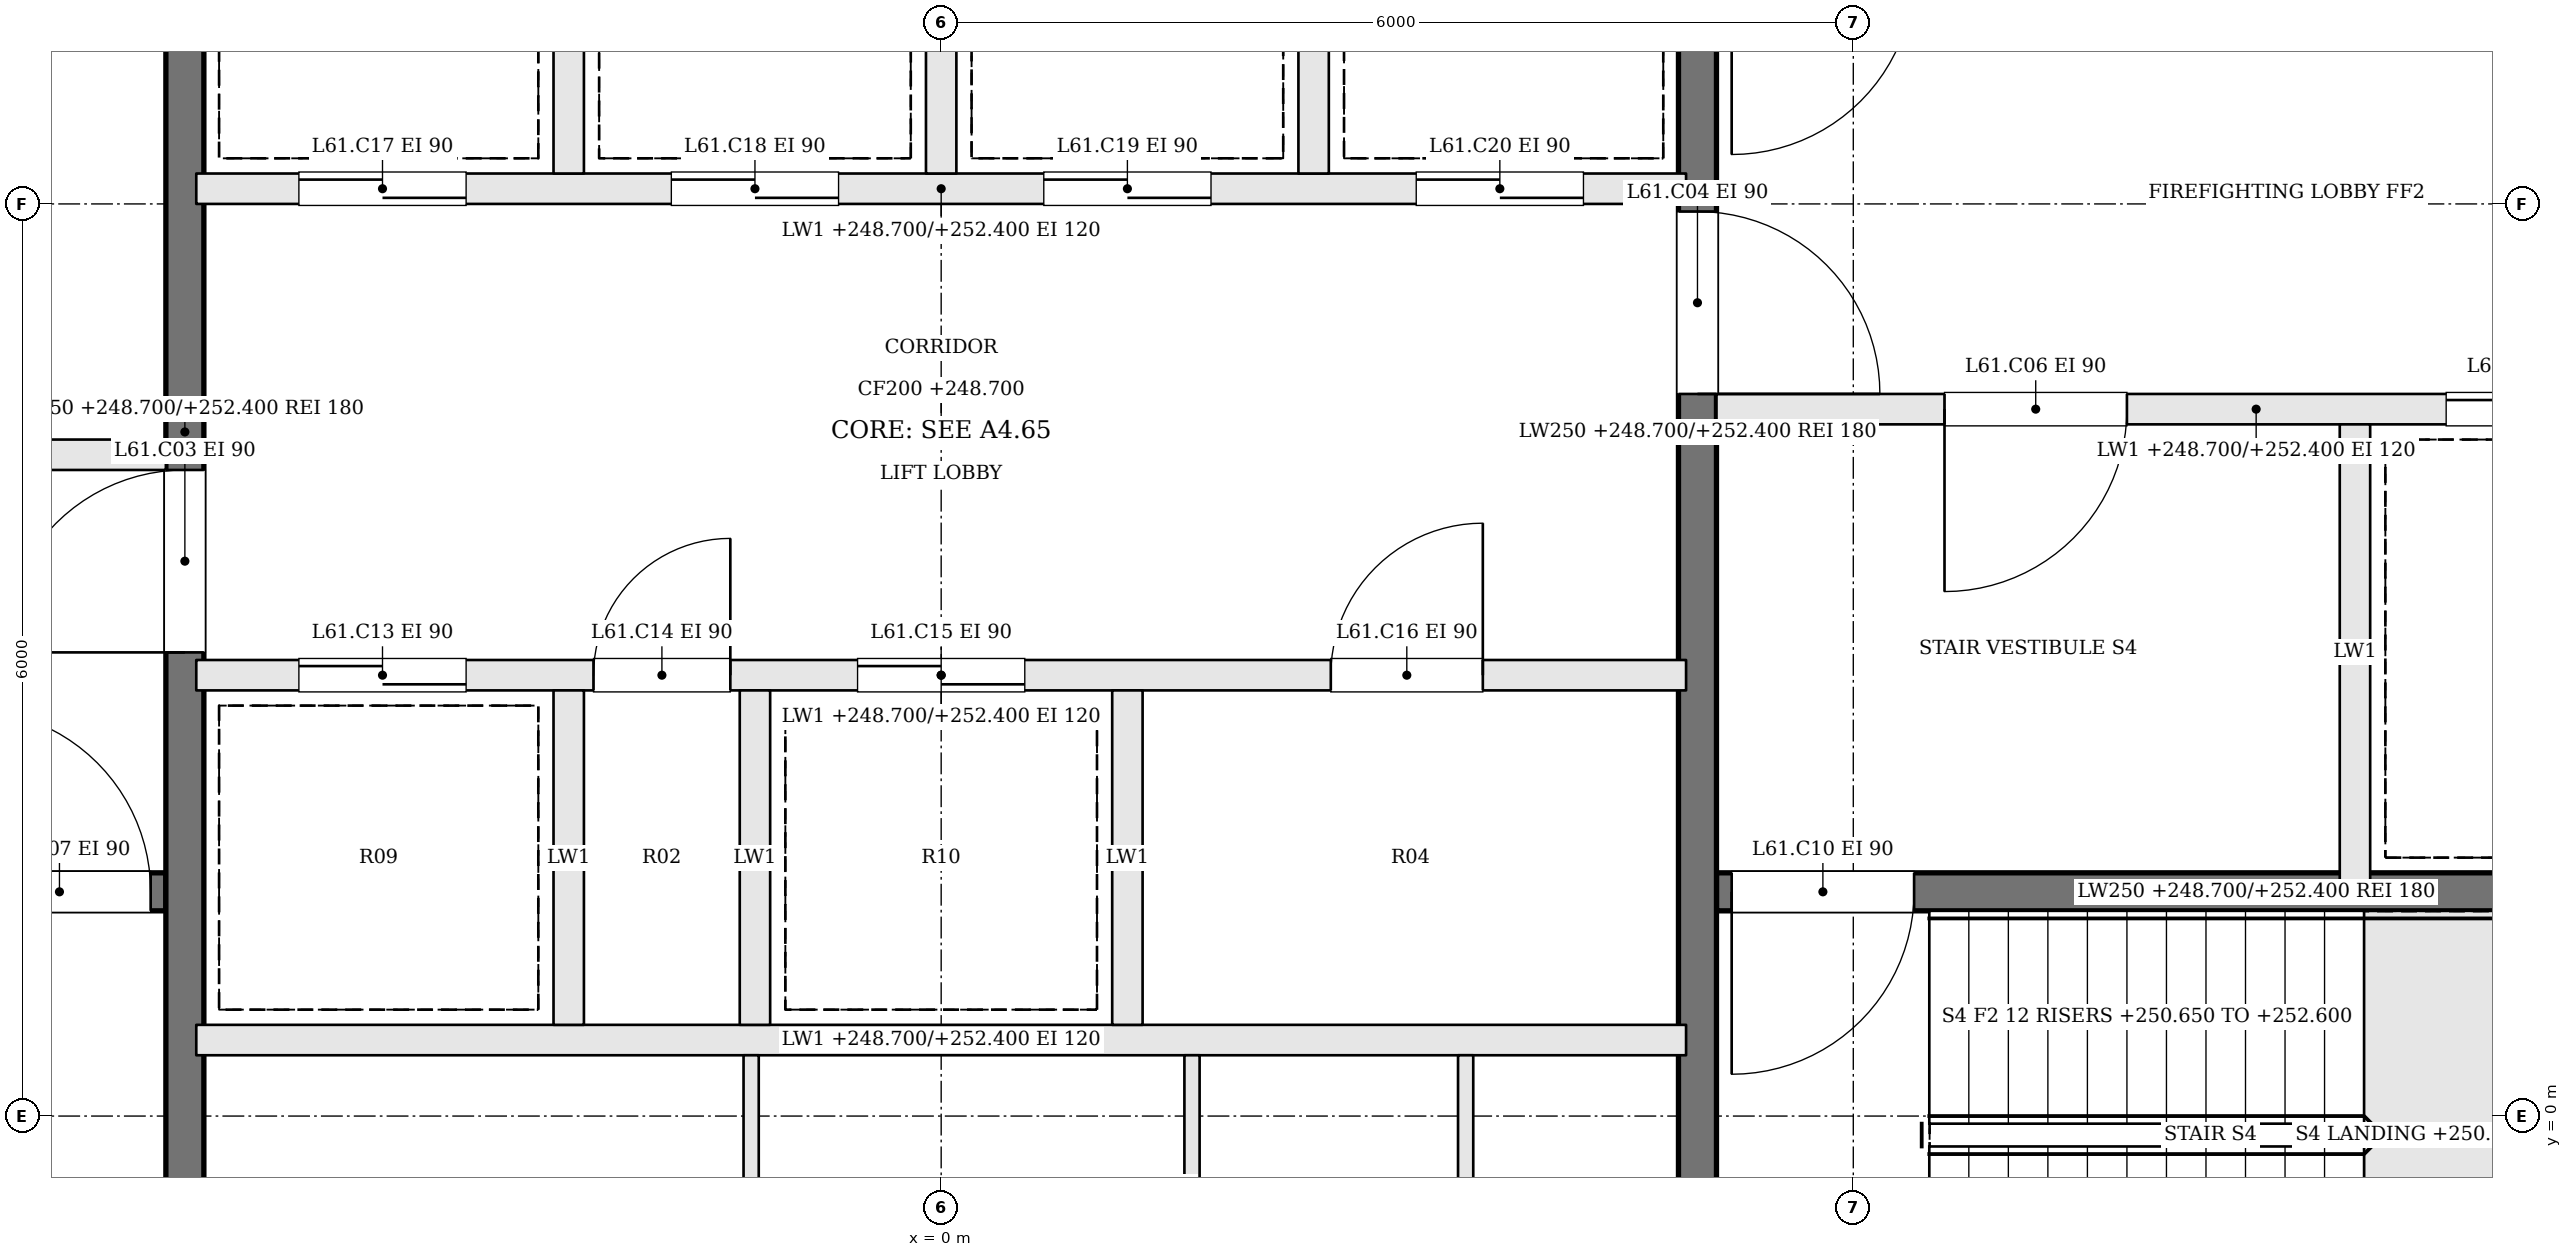
"""IFC4 building model, lengths in metres.
Left out: names, types, materials, properties, quantities, classifications, styles, units other than length and angle.
Written with IfcOpenShell. Run it as: python <this file> out.ifc"""

import sys

from ifc_helpers import new_model, si_unit, direction, frame, frame_2d, origin, place, context, subcontext, project, spatial, rectangle, extrude, element, fill, save


model = new_model("IFC4")
c1 = context("Model", 3, precision=1e-05, world=origin(), true_north=direction((0.0, 1.0)))
c2 = subcontext(c1, "Body", "Model", "MODEL_VIEW")
j1 = project(units=[si_unit("LENGTHUNIT", "METRE"), si_unit("PLANEANGLEUNIT", "RADIAN")], contexts=[c1])
p1 = place(None, origin())
s1 = spatial("IfcSite", under=j1, at=p1, CompositionType="ELEMENT")
p2 = place(p1, origin())
s2 = spatial("IfcBuilding", under=s1, at=p2, CompositionType="ELEMENT")
p3 = place(p2, frame((0.0, 0.0, 248.7)))
s3 = spatial("IfcBuildingStorey", under=s2, at=p3, CompositionType="ELEMENT", Elevation=248.7)
p4 = place(p3, frame((-12.2, 1.475, 0.0), z_axis=(0.0, 0.0, 1.0), x_axis=(1.0, 0.0, 0.0)))
e1 = element("IfcWall", 1, at=p4, inside=s3, PredefinedType="SOLIDWALL", context=c2, shape_type="SweptSolid", body=[
    extrude(rectangle(XDim=7.1, YDim=0.25, at=frame_2d((3.55, 0.0))), origin(), (0.0, 0.0, 1.0), 3.7),
])
p5 = place(p4, frame((5.8, 0.0, 0.0)))
e2 = element("IfcOpeningElement", 2, at=p5, cuts=e1, PredefinedType="OPENING", context=c2, shape_type="SweptSolid", body=[
    extrude(rectangle(XDim=1.2, YDim=2.1, at=frame_2d((0.6, 1.05))), frame((0.0, 0.135, 0.0), z_axis=(0.0, -1.0, 0.0), x_axis=(1.0, 0.0, 0.0)), (0.0, 0.0, 1.0), 0.27),
])
p6 = place(p3, frame((-12.2, 4.35, 0.0), z_axis=(0.0, 0.0, 1.0), x_axis=(1.0, 0.0, 0.0)))
e3 = element("IfcWall", 3, at=p6, inside=s3, PredefinedType="SOLIDWALL", context=c2, shape_type="SweptSolid", body=[
    extrude(rectangle(XDim=7.1, YDim=0.2, at=frame_2d((3.55, 0.0))), origin(), (0.0, 0.0, 1.0), 3.7),
])
p7 = place(p6, frame((4.4, 0.0, 0.0)))
e4 = element("IfcOpeningElement", 4, at=p7, cuts=e3, PredefinedType="OPENING", context=c2, shape_type="SweptSolid", body=[
    extrude(rectangle(XDim=1.2, YDim=2.1, at=frame_2d((0.6, 1.05))), frame((0.0, 0.11, 0.0), z_axis=(0.0, -1.0, 0.0), x_axis=(1.0, 0.0, 0.0)), (0.0, 0.0, 1.0), 0.22),
])
p8 = place(p6, frame((1.1, 0.0, 0.0)))
e5 = element("IfcOpeningElement", 5, at=p8, cuts=e3, PredefinedType="OPENING", context=c2, shape_type="SweptSolid", body=[
    extrude(rectangle(XDim=1.2, YDim=2.1, at=frame_2d((0.6, 1.05))), frame((0.0, 0.11, 0.0), z_axis=(0.0, -1.0, 0.0), x_axis=(1.0, 0.0, 0.0)), (0.0, 0.0, 1.0), 0.22),
])
p9 = place(p3, frame((12.2, 4.65, 0.0), z_axis=(0.0, 0.0, 1.0), x_axis=(-1.0, 0.0, 0.0)))
e6 = element("IfcWall", 6, at=p9, inside=s3, PredefinedType="SOLIDWALL", context=c2, shape_type="SweptSolid", body=[
    extrude(rectangle(XDim=7.1, YDim=0.2, at=frame_2d((3.55, 0.0))), origin(), (0.0, 0.0, 1.0), 3.7),
])
p10 = place(p9, frame((4.4, 0.0, 0.0)))
e7 = element("IfcOpeningElement", 7, at=p10, cuts=e6, PredefinedType="OPENING", context=c2, shape_type="SweptSolid", body=[
    extrude(rectangle(XDim=1.2, YDim=2.1, at=frame_2d((0.6, 1.05))), frame((0.0, 0.11, 0.0), z_axis=(0.0, -1.0, 0.0), x_axis=(1.0, 0.0, 0.0)), (0.0, 0.0, 1.0), 0.22),
])
p11 = place(p9, frame((1.1, 0.0, 0.0)))
e8 = element("IfcOpeningElement", 8, at=p11, cuts=e6, PredefinedType="OPENING", context=c2, shape_type="SweptSolid", body=[
    extrude(rectangle(XDim=1.2, YDim=2.1, at=frame_2d((0.6, 1.05))), frame((0.0, 0.11, 0.0), z_axis=(0.0, -1.0, 0.0), x_axis=(1.0, 0.0, 0.0)), (0.0, 0.0, 1.0), 0.22),
])
p12 = place(p3, frame((12.2, 1.475, 0.0), z_axis=(0.0, 0.0, 1.0), x_axis=(-1.0, 0.0, 0.0)))
e9 = element("IfcWall", 9, at=p12, inside=s3, PredefinedType="SOLIDWALL", context=c2, shape_type="SweptSolid", body=[
    extrude(rectangle(XDim=7.1, YDim=0.25, at=frame_2d((3.55, 0.0))), origin(), (0.0, 0.0, 1.0), 3.7),
])
p13 = place(p12, frame((5.8, 0.0, 0.0)))
e10 = element("IfcOpeningElement", 10, at=p13, cuts=e9, PredefinedType="OPENING", context=c2, shape_type="SweptSolid", body=[
    extrude(rectangle(XDim=1.2, YDim=2.1, at=frame_2d((0.6, 1.05))), frame((0.0, 0.135, 0.0), z_axis=(0.0, -1.0, 0.0), x_axis=(1.0, 0.0, 0.0)), (0.0, 0.0, 1.0), 0.27),
])
p14 = place(p3, frame((9.3, 4.55, 0.0), z_axis=(0.0, 0.0, 1.0), x_axis=(0.0, -1.0, 0.0)))
e11 = element("IfcWall", 11, at=p14, inside=s3, PredefinedType="SOLIDWALL", context=c2, shape_type="SweptSolid", body=[
    extrude(rectangle(XDim=3.0, YDim=0.2, at=frame_2d((1.5, 0.0))), origin(), (0.0, 0.0, 1.0), 3.7),
])
p15 = place(p3, frame((-4.975, -2.2, 0.0), z_axis=(0.0, 0.0, 1.0), x_axis=(0.0, 1.0, 0.0)))
e12 = element("IfcWall", 12, at=p15, inside=s3, PredefinedType="SOLIDWALL", context=c2, shape_type="SweptSolid", body=[
    extrude(rectangle(XDim=13.4, YDim=0.25, at=frame_2d((6.7, 0.0))), origin(), (0.0, 0.0, 1.0), 3.7),
])
p16 = place(p15, frame((5.25, 0.0, 0.0)))
e13 = element("IfcOpeningElement", 13, at=p16, cuts=e12, PredefinedType="OPENING", context=c2, shape_type="SweptSolid", body=[
    extrude(rectangle(XDim=1.2, YDim=2.1, at=frame_2d((0.6, 1.05))), frame((0.0, 0.135, 0.0), z_axis=(0.0, -1.0, 0.0), x_axis=(1.0, 0.0, 0.0)), (0.0, 0.0, 1.0), 0.27),
])
p17 = place(p3, frame((4.975, 11.2, 0.0), z_axis=(0.0, 0.0, 1.0), x_axis=(0.0, -1.0, 0.0)))
e14 = element("IfcWall", 14, at=p17, inside=s3, PredefinedType="SOLIDWALL", context=c2, shape_type="SweptSolid", body=[
    extrude(rectangle(XDim=13.4, YDim=0.25, at=frame_2d((6.7, 0.0))), origin(), (0.0, 0.0, 1.0), 3.7),
])
p18 = place(p17, frame((5.25, 0.0, 0.0)))
e15 = element("IfcOpeningElement", 15, at=p18, cuts=e14, PredefinedType="OPENING", context=c2, shape_type="SweptSolid", body=[
    extrude(rectangle(XDim=1.2, YDim=2.1, at=frame_2d((0.6, 1.05))), frame((0.0, 0.135, 0.0), z_axis=(0.0, -1.0, 0.0), x_axis=(1.0, 0.0, 0.0)), (0.0, 0.0, 1.0), 0.27),
])
p19 = place(p3, frame((-4.9, 0.5, 0.0), z_axis=(0.0, 0.0, 1.0), x_axis=(1.0, 0.0, 0.0)))
e16 = element("IfcWall", 16, at=p19, inside=s3, PredefinedType="SOLIDWALL", context=c2, shape_type="SweptSolid", body=[
    extrude(rectangle(XDim=9.8, YDim=0.2, at=frame_2d((4.9, 0.0))), origin(), (0.0, 0.0, 1.0), 3.7),
])
p20 = place(p3, frame((-4.9, 2.9, 0.0), z_axis=(0.0, 0.0, 1.0), x_axis=(1.0, 0.0, 0.0)))
e17 = element("IfcWall", 17, at=p20, inside=s3, PredefinedType="SOLIDWALL", context=c2, shape_type="SweptSolid", body=[
    extrude(rectangle(XDim=9.8, YDim=0.2, at=frame_2d((4.9, 0.0))), origin(), (0.0, 0.0, 1.0), 3.7),
])
p21 = place(p20, frame((0.675, 0.0, 0.0)))
e18 = element("IfcOpeningElement", 18, at=p21, cuts=e17, PredefinedType="OPENING", context=c2, shape_type="SweptSolid", body=[
    extrude(rectangle(XDim=1.1, YDim=2.1, at=frame_2d((0.55, 1.05))), frame((0.0, 0.11, 0.0), z_axis=(0.0, -1.0, 0.0), x_axis=(1.0, 0.0, 0.0)), (0.0, 0.0, 1.0), 0.22),
])
p22 = place(p20, frame((2.613, 0.0, 0.0)))
e19 = element("IfcOpeningElement", 19, at=p22, cuts=e17, PredefinedType="OPENING", context=c2, shape_type="SweptSolid", body=[
    extrude(rectangle(XDim=0.9, YDim=2.1, at=frame_2d((0.45, 1.05))), frame((0.0, 0.11, 0.0), z_axis=(0.0, -1.0, 0.0), x_axis=(1.0, 0.0, 0.0)), (0.0, 0.0, 1.0), 0.22),
])
p23 = place(p20, frame((4.35, 0.0, 0.0)))
e20 = element("IfcOpeningElement", 20, at=p23, cuts=e17, PredefinedType="OPENING", context=c2, shape_type="SweptSolid", body=[
    extrude(rectangle(XDim=1.1, YDim=2.1, at=frame_2d((0.55, 1.05))), frame((0.0, 0.11, 0.0), z_axis=(0.0, -1.0, 0.0), x_axis=(1.0, 0.0, 0.0)), (0.0, 0.0, 1.0), 0.22),
])
p24 = place(p20, frame((7.463, 0.0, 0.0)))
e21 = element("IfcOpeningElement", 21, at=p24, cuts=e17, PredefinedType="OPENING", context=c2, shape_type="SweptSolid", body=[
    extrude(rectangle(XDim=1.0, YDim=2.1, at=frame_2d((0.5, 1.05))), frame((0.0, 0.11, 0.0), z_axis=(0.0, -1.0, 0.0), x_axis=(1.0, 0.0, 0.0)), (0.0, 0.0, 1.0), 0.22),
])
p25 = place(p3, frame((-4.9, 6.1, 0.0), z_axis=(0.0, 0.0, 1.0), x_axis=(1.0, 0.0, 0.0)))
e22 = element("IfcWall", 22, at=p25, inside=s3, PredefinedType="SOLIDWALL", context=c2, shape_type="SweptSolid", body=[
    extrude(rectangle(XDim=9.8, YDim=0.2, at=frame_2d((4.9, 0.0))), origin(), (0.0, 0.0, 1.0), 3.7),
])
p26 = place(p25, frame((0.675, 0.0, 0.0)))
e23 = element("IfcOpeningElement", 23, at=p26, cuts=e22, PredefinedType="OPENING", context=c2, shape_type="SweptSolid", body=[
    extrude(rectangle(XDim=1.1, YDim=2.1, at=frame_2d((0.55, 1.05))), frame((0.0, 0.11, 0.0), z_axis=(0.0, -1.0, 0.0), x_axis=(1.0, 0.0, 0.0)), (0.0, 0.0, 1.0), 0.22),
])
p27 = place(p25, frame((3.125, 0.0, 0.0)))
e24 = element("IfcOpeningElement", 24, at=p27, cuts=e22, PredefinedType="OPENING", context=c2, shape_type="SweptSolid", body=[
    extrude(rectangle(XDim=1.1, YDim=2.1, at=frame_2d((0.55, 1.05))), frame((0.0, 0.11, 0.0), z_axis=(0.0, -1.0, 0.0), x_axis=(1.0, 0.0, 0.0)), (0.0, 0.0, 1.0), 0.22),
])
p28 = place(p25, frame((5.575, 0.0, 0.0)))
e25 = element("IfcOpeningElement", 25, at=p28, cuts=e22, PredefinedType="OPENING", context=c2, shape_type="SweptSolid", body=[
    extrude(rectangle(XDim=1.1, YDim=2.1, at=frame_2d((0.55, 1.05))), frame((0.0, 0.11, 0.0), z_axis=(0.0, -1.0, 0.0), x_axis=(1.0, 0.0, 0.0)), (0.0, 0.0, 1.0), 0.22),
])
p29 = place(p25, frame((8.025, 0.0, 0.0)))
e26 = element("IfcOpeningElement", 26, at=p29, cuts=e22, PredefinedType="OPENING", context=c2, shape_type="SweptSolid", body=[
    extrude(rectangle(XDim=1.1, YDim=2.1, at=frame_2d((0.55, 1.05))), frame((0.0, 0.11, 0.0), z_axis=(0.0, -1.0, 0.0), x_axis=(1.0, 0.0, 0.0)), (0.0, 0.0, 1.0), 0.22),
])
for number, where, z_axis, x_axis in (
    (27, (-2.45, 0.6, 0.0), (0.0, 0.0, 1.0), (0.0, 1.0, 0.0)),
    (28, (-1.225, 0.6, 0.0), (0.0, 0.0, 1.0), (0.0, 1.0, 0.0)),
    (29, (1.225, 0.6, 0.0), (0.0, 0.0, 1.0), (0.0, 1.0, 0.0)),
    (30, (-2.45, 6.2, 0.0), (0.0, 0.0, 1.0), (0.0, 1.0, 0.0)),
    (31, (0.0, 6.2, 0.0), (0.0, 0.0, 1.0), (0.0, 1.0, 0.0)),
    (32, (2.45, 6.2, 0.0), (0.0, 0.0, 1.0), (0.0, 1.0, 0.0)),
):
    element("IfcWall", number, at=place(p3, frame(where, z_axis=z_axis, x_axis=x_axis)), inside=s3, PredefinedType="SOLIDWALL", context=c2, shape_type="SweptSolid", body=[
        extrude(rectangle(XDim=2.2, YDim=0.2, at=frame_2d((1.1, 0.0))), origin(), (0.0, 0.0, 1.0), 3.7),
    ])
for number, where, z_axis, x_axis in (
    (33, (-1.25, -2.2, 0.0), (0.0, 0.0, 1.0), (0.0, 1.0, 0.0)),
    (34, (1.65, -2.2, 0.0), (0.0, 0.0, 1.0), (0.0, 1.0, 0.0)),
    (35, (3.45, -2.2, 0.0), (0.0, 0.0, 1.0), (0.0, 1.0, 0.0)),
):
    element("IfcWall", number, at=place(p3, frame(where, z_axis=z_axis, x_axis=x_axis)), inside=s3, PredefinedType="PARTITIONING", context=c2, shape_type="SweptSolid", body=[
        extrude(rectangle(XDim=2.6, YDim=0.1, at=frame_2d((1.3, 0.0))), origin(), (0.0, 0.0, 1.0), 3.7),
    ])
p30 = place(p16, origin())
e36 = element("IfcDoor", 36, at=p30, inside=s3, OperationType="SINGLE_SWING_LEFT", PredefinedType="DOOR", context=c2, shape_type="SweptSolid", body=[
    extrude(rectangle(XDim=1.2, YDim=2.1, at=frame_2d((0.6, 1.05))), frame((0.0, 0.025, 0.0), z_axis=(0.0, -1.0, 0.0), x_axis=(1.0, 0.0, 0.0)), (0.0, 0.0, 1.0), 0.05),
])
fill(e13, e36)
p31 = place(p18, origin())
e37 = element("IfcDoor", 37, at=p31, inside=s3, OperationType="SINGLE_SWING_RIGHT", PredefinedType="DOOR", context=c2, shape_type="SweptSolid", body=[
    extrude(rectangle(XDim=1.2, YDim=2.1, at=frame_2d((0.6, 1.05))), frame((0.0, 0.025, 0.0), z_axis=(0.0, -1.0, 0.0), x_axis=(1.0, 0.0, 0.0)), (0.0, 0.0, 1.0), 0.05),
])
fill(e15, e37)
p32 = place(p10, origin())
e38 = element("IfcDoor", 38, at=p32, inside=s3, OperationType="SINGLE_SWING_RIGHT", PredefinedType="DOOR", context=c2, shape_type="SweptSolid", body=[
    extrude(rectangle(XDim=1.2, YDim=2.1, at=frame_2d((0.6, 1.05))), frame((0.0, 0.025, 0.0), z_axis=(0.0, -1.0, 0.0), x_axis=(1.0, 0.0, 0.0)), (0.0, 0.0, 1.0), 0.05),
])
fill(e7, e38)
p33 = place(p5, origin())
e39 = element("IfcDoor", 39, at=p33, inside=s3, OperationType="SINGLE_SWING_LEFT", PredefinedType="DOOR", context=c2, shape_type="SweptSolid", body=[
    extrude(rectangle(XDim=1.2, YDim=2.1, at=frame_2d((0.6, 1.05))), frame((0.0, 0.025, 0.0), z_axis=(0.0, -1.0, 0.0), x_axis=(1.0, 0.0, 0.0)), (0.0, 0.0, 1.0), 0.05),
])
fill(e2, e39)
p34 = place(p13, origin())
e40 = element("IfcDoor", 40, at=p34, inside=s3, OperationType="SINGLE_SWING_RIGHT", PredefinedType="DOOR", context=c2, shape_type="SweptSolid", body=[
    extrude(rectangle(XDim=1.2, YDim=2.1, at=frame_2d((0.6, 1.05))), frame((0.0, 0.025, 0.0), z_axis=(0.0, -1.0, 0.0), x_axis=(1.0, 0.0, 0.0)), (0.0, 0.0, 1.0), 0.05),
])
fill(e10, e40)
p35 = place(p11, origin())
e41 = element("IfcDoor", 41, at=p35, inside=s3, OperationType="SLIDING_TO_RIGHT", PredefinedType="DOOR", context=c2, shape_type="SweptSolid", body=[
    extrude(rectangle(XDim=1.2, YDim=2.1, at=frame_2d((0.6, 1.05))), frame((0.0, 0.025, 0.0), z_axis=(0.0, -1.0, 0.0), x_axis=(1.0, 0.0, 0.0)), (0.0, 0.0, 1.0), 0.05),
])
fill(e8, e41)
p36 = place(p21, origin())
e42 = element("IfcDoor", 42, at=p36, inside=s3, OperationType="SLIDING_TO_RIGHT", PredefinedType="DOOR", context=c2, shape_type="SweptSolid", body=[
    extrude(rectangle(XDim=1.1, YDim=2.1, at=frame_2d((0.55, 1.05))), frame((0.0, 0.025, 0.0), z_axis=(0.0, -1.0, 0.0), x_axis=(1.0, 0.0, 0.0)), (0.0, 0.0, 1.0), 0.05),
])
fill(e18, e42)
p37 = place(p22, origin())
e43 = element("IfcDoor", 43, at=p37, inside=s3, OperationType="SINGLE_SWING_RIGHT", PredefinedType="DOOR", context=c2, shape_type="SweptSolid", body=[
    extrude(rectangle(XDim=0.9, YDim=2.1, at=frame_2d((0.45, 1.05))), frame((0.0, 0.025, 0.0), z_axis=(0.0, -1.0, 0.0), x_axis=(1.0, 0.0, 0.0)), (0.0, 0.0, 1.0), 0.05),
])
fill(e19, e43)
p38 = place(p23, origin())
e44 = element("IfcDoor", 44, at=p38, inside=s3, OperationType="SLIDING_TO_LEFT", PredefinedType="DOOR", context=c2, shape_type="SweptSolid", body=[
    extrude(rectangle(XDim=1.1, YDim=2.1, at=frame_2d((0.55, 1.05))), frame((0.0, 0.025, 0.0), z_axis=(0.0, -1.0, 0.0), x_axis=(1.0, 0.0, 0.0)), (0.0, 0.0, 1.0), 0.05),
])
fill(e20, e44)
p39 = place(p24, origin())
e45 = element("IfcDoor", 45, at=p39, inside=s3, OperationType="SINGLE_SWING_RIGHT", PredefinedType="DOOR", context=c2, shape_type="SweptSolid", body=[
    extrude(rectangle(XDim=1.0, YDim=2.1, at=frame_2d((0.5, 1.05))), frame((0.0, 0.025, 0.0), z_axis=(0.0, -1.0, 0.0), x_axis=(1.0, 0.0, 0.0)), (0.0, 0.0, 1.0), 0.05),
])
fill(e21, e45)
p40 = place(p26, origin())
e46 = element("IfcDoor", 46, at=p40, inside=s3, OperationType="SLIDING_TO_RIGHT", PredefinedType="DOOR", context=c2, shape_type="SweptSolid", body=[
    extrude(rectangle(XDim=1.1, YDim=2.1, at=frame_2d((0.55, 1.05))), frame((0.0, 0.025, 0.0), z_axis=(0.0, -1.0, 0.0), x_axis=(1.0, 0.0, 0.0)), (0.0, 0.0, 1.0), 0.05),
])
fill(e23, e46)
p41 = place(p27, origin())
e47 = element("IfcDoor", 47, at=p41, inside=s3, OperationType="SLIDING_TO_LEFT", PredefinedType="DOOR", context=c2, shape_type="SweptSolid", body=[
    extrude(rectangle(XDim=1.1, YDim=2.1, at=frame_2d((0.55, 1.05))), frame((0.0, 0.025, 0.0), z_axis=(0.0, -1.0, 0.0), x_axis=(1.0, 0.0, 0.0)), (0.0, 0.0, 1.0), 0.05),
])
fill(e24, e47)
p42 = place(p28, origin())
e48 = element("IfcDoor", 48, at=p42, inside=s3, OperationType="SLIDING_TO_RIGHT", PredefinedType="DOOR", context=c2, shape_type="SweptSolid", body=[
    extrude(rectangle(XDim=1.1, YDim=2.1, at=frame_2d((0.55, 1.05))), frame((0.0, 0.025, 0.0), z_axis=(0.0, -1.0, 0.0), x_axis=(1.0, 0.0, 0.0)), (0.0, 0.0, 1.0), 0.05),
])
fill(e25, e48)
p43 = place(p29, origin())
e49 = element("IfcDoor", 49, at=p43, inside=s3, OperationType="SLIDING_TO_LEFT", PredefinedType="DOOR", context=c2, shape_type="SweptSolid", body=[
    extrude(rectangle(XDim=1.1, YDim=2.1, at=frame_2d((0.55, 1.05))), frame((0.0, 0.025, 0.0), z_axis=(0.0, -1.0, 0.0), x_axis=(1.0, 0.0, 0.0)), (0.0, 0.0, 1.0), 0.05),
])
fill(e26, e49)
save(model, sys.argv[1])
